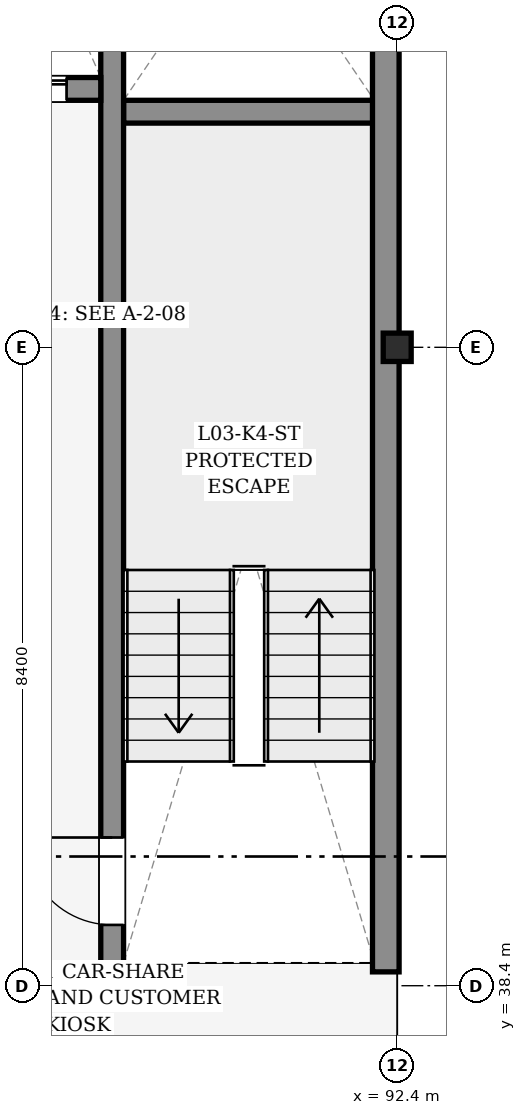
"""IFC4 building model, lengths in metres.
Left out: names, types, materials, properties, quantities, classifications, styles, units other than length and angle.
Written with IfcOpenShell. Run it as: python <this file> out.ifc"""

import sys

from ifc_helpers import new_model, si_unit, direction, frame, frame_2d, origin, origin_2d, place, context, subcontext, project, spatial, rectangle, i_section, extrude, element, fill, save


model = new_model("IFC4")
c1 = context("Model", 3, precision=1e-05, world=origin(), true_north=direction((0.0, 1.0)))
c2 = subcontext(c1, "Body", "Model", "MODEL_VIEW")
j1 = project(units=[si_unit("LENGTHUNIT", "METRE"), si_unit("PLANEANGLEUNIT", "RADIAN")], contexts=[c1])
p1 = place(None, origin())
s1 = spatial("IfcSite", under=j1, at=p1, CompositionType="ELEMENT")
p2 = place(p1, origin())
s2 = spatial("IfcBuilding", under=s1, at=p2, CompositionType="ELEMENT")
p3 = place(p2, frame((0.0, 0.0, 12.6)))
s3 = spatial("IfcBuildingStorey", under=s2, at=p3, CompositionType="ELEMENT", Elevation=12.6)
for number, where, z_axis, x_axis in (
    (1, (92.4, 38.4, 0.0), (0.0, 0.0, 1.0), (1.0, 0.0, 0.0)),
    (2, (92.4, 46.8, 0.0), (0.0, 0.0, 1.0), (1.0, 0.0, 0.0)),
):
    element("IfcColumn", number, at=place(p3, frame(where, z_axis=z_axis, x_axis=x_axis)), inside=s3, PredefinedType="COLUMN", context=c2, shape_type="SweptSolid", body=[
        extrude(i_section(OverallWidth=0.373, OverallDepth=0.368, WebThickness=0.014, FlangeThickness=0.024, FilletRadius=0.015, at=origin_2d()), origin(), (0.0, 0.0, 1.0), 3.6),
    ])
p4 = place(p3, frame((84.185, 38.55, 0.0), z_axis=(0.0, 0.0, 1.0), x_axis=(1.0, 0.0, 0.0)))
e3 = element("IfcWall", 3, at=p4, inside=s3, PredefinedType="SHEAR", context=c2, shape_type="SweptSolid", body=[
    extrude(rectangle(XDim=8.031, YDim=0.3, at=frame_2d((4.016, 0.0))), origin(), (0.0, 0.0, 1.0), 3.38),
])
p5 = place(p3, frame((88.8, 49.9, 0.0), z_axis=(0.0, 0.0, 1.0), x_axis=(1.0, 0.0, 0.0)))
e4 = element("IfcWall", 4, at=p5, inside=s3, PredefinedType="SHEAR", context=c2, shape_type="SweptSolid", body=[
    extrude(rectangle(XDim=3.3, YDim=0.3, at=frame_2d((1.65, 0.0))), origin(), (0.0, 0.0, 1.0), 3.38),
])
p6 = place(p3, frame((92.25, 38.582, 0.0), z_axis=(0.0, 0.0, 1.0), x_axis=(0.0, 1.0, 0.0)))
e5 = element("IfcWall", 5, at=p6, inside=s3, PredefinedType="SHEAR", context=c2, shape_type="SweptSolid", body=[
    extrude(rectangle(XDim=16.436, YDim=0.35, at=frame_2d((8.218, 0.0))), origin(), (0.0, 0.0, 1.0), 3.38),
])
p7 = place(p3, frame((88.65, 38.7, 0.0), z_axis=(0.0, 0.0, 1.0), x_axis=(0.0, 1.0, 0.0)))
e6 = element("IfcWall", 6, at=p7, inside=s3, PredefinedType="SHEAR", context=c2, shape_type="SweptSolid", body=[
    extrude(rectangle(XDim=16.2, YDim=0.3, at=frame_2d((8.1, 0.0))), origin(), (0.0, 0.0, 1.0), 3.38),
])
p8 = place(p7, frame((0.5, 0.0, 0.0)))
e7 = element("IfcOpeningElement", 7, at=p8, cuts=e6, PredefinedType="OPENING", context=c2, shape_type="SweptSolid", body=[
    extrude(rectangle(XDim=1.15, YDim=2.15, at=frame_2d((0.575, 1.075))), frame((0.0, 0.16, 0.0), z_axis=(0.0, -1.0, 0.0), x_axis=(1.0, 0.0, 0.0)), (0.0, 0.0, 1.0), 0.32),
])
p9 = place(p3, frame((86.3, 50.2, 0.0), z_axis=(0.0, 0.0, 1.0), x_axis=(1.0, 0.0, 0.0)))
e8 = element("IfcWall", 8, at=p9, inside=s3, PredefinedType="SHEAR", context=c2, shape_type="SweptSolid", body=[
    extrude(rectangle(XDim=2.2, YDim=0.3, at=frame_2d((1.1, 0.0))), origin(), (0.0, 0.0, 1.0), 3.38),
])
p10 = place(p9, frame((0.65, 0.0, 0.0)))
e9 = element("IfcOpeningElement", 9, at=p10, cuts=e8, PredefinedType="OPENING", context=c2, shape_type="SweptSolid", body=[
    extrude(rectangle(XDim=1.1, YDim=2.2, at=frame_2d((0.55, 1.1))), frame((0.0, 0.16, 0.0), z_axis=(0.0, -1.0, 0.0), x_axis=(1.0, 0.0, 0.0)), (0.0, 0.0, 1.0), 0.32),
])
p11 = place(p8, origin())
e10 = element("IfcDoor", 10, at=p11, inside=s3, OperationType="SINGLE_SWING_RIGHT", PredefinedType="DOOR", context=c2, shape_type="SweptSolid", body=[
    extrude(rectangle(XDim=1.15, YDim=2.15, at=frame_2d((0.575, 1.075))), frame((0.0, 0.025, 0.0), z_axis=(0.0, -1.0, 0.0), x_axis=(1.0, 0.0, 0.0)), (0.0, 0.0, 1.0), 0.05),
])
fill(e7, e10)
p12 = place(p10, origin())
e11 = element("IfcDoor", 11, at=p12, inside=s3, OperationType="SLIDING_TO_LEFT", PredefinedType="DOOR", context=c2, shape_type="SweptSolid", body=[
    extrude(rectangle(XDim=1.1, YDim=2.2, at=frame_2d((0.55, 1.1))), frame((0.0, 0.025, 0.0), z_axis=(0.0, -1.0, 0.0), x_axis=(1.0, 0.0, 0.0)), (0.0, 0.0, 1.0), 0.05),
])
fill(e9, e11)
save(model, sys.argv[1])
